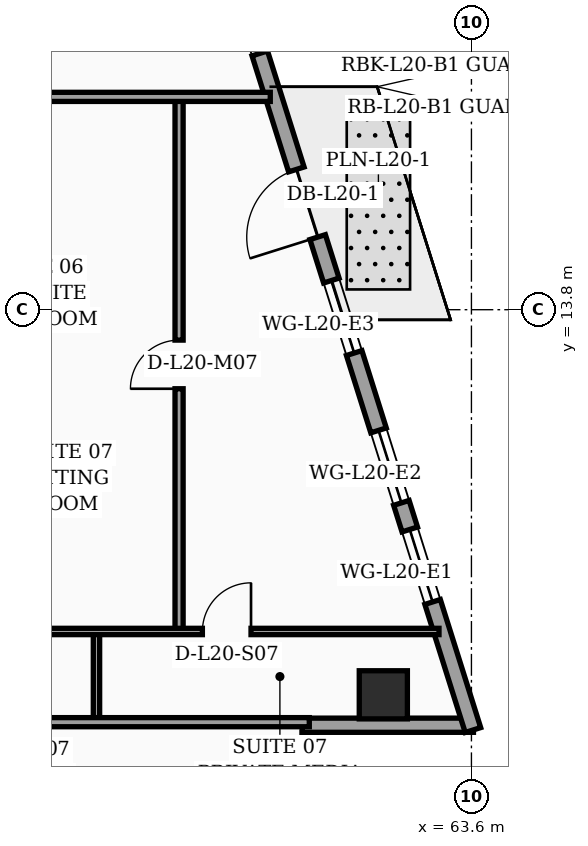
"""IFC4 building model, lengths in metres.
Left out: names, types, materials, properties, quantities, classifications, styles, units other than length and angle.
Written with IfcOpenShell. Run it as: python <this file> out.ifc"""

import sys

from ifc_helpers import new_model, si_unit, direction, frame, frame_2d, origin, origin_2d, place, context, subcontext, project, spatial, rectangle, hollow_rectangle, extrude, element, fill, save


model = new_model("IFC4")
c1 = context("Model", 3, precision=1e-05, world=origin(), true_north=direction((0.0, 1.0)))
c2 = subcontext(c1, "Body", "Model", "MODEL_VIEW")
j1 = project(units=[si_unit("LENGTHUNIT", "METRE"), si_unit("PLANEANGLEUNIT", "RADIAN")], contexts=[c1])
p1 = place(None, origin())
s1 = spatial("IfcSite", under=j1, at=p1, CompositionType="ELEMENT")
p2 = place(p1, origin())
s2 = spatial("IfcBuilding", under=s1, at=p2, CompositionType="ELEMENT")
p3 = place(p2, frame((0.0, 0.0, 85.0)))
s3 = spatial("IfcBuildingStorey", under=s2, at=p3, CompositionType="ELEMENT", Elevation=85.0)
p4 = place(p3, frame((61.861, 6.2, 0.0), z_axis=(0.0, 0.0, 1.0), x_axis=(1.0, 0.0, 0.0)))
e1 = element("IfcColumn", 1, at=p4, inside=s3, PredefinedType="COLUMN", context=c2, shape_type="SweptSolid", body=[
    extrude(hollow_rectangle(XDim=0.95, YDim=0.95, WallThickness=0.04, at=origin_2d()), origin(), (0.0, 0.0, 1.0), 3.56),
])
p5 = place(p3, frame((60.4, 2.52, 0.0), z_axis=(0.0, 0.0, 1.0), x_axis=(0.0, 1.0, 0.0)))
e2 = element("IfcWall", 2, at=p5, inside=s3, PredefinedType="SOLIDWALL", context=c2, shape_type="SweptSolid", body=[
    extrude(rectangle(XDim=2.94, YDim=0.28, at=frame_2d((1.47, 0.0))), origin(), (0.0, 0.0, 1.0), 3.04),
])
p6 = place(p3, frame((60.26, 5.6, 0.0), z_axis=(0.0, 0.0, 1.0), x_axis=(1.0, 0.0, 0.0)))
e3 = element("IfcWall", 3, at=p6, inside=s3, PredefinedType="SOLIDWALL", context=c2, shape_type="SweptSolid", body=[
    extrude(rectangle(XDim=3.38, YDim=0.28, at=frame_2d((1.69, 0.0))), origin(), (0.0, 0.0, 1.0), 3.04),
])
p7 = place(p3, frame((63.63, 5.505, 0.0), z_axis=(0.0, 0.0, 1.0), x_axis=(-0.300501856448, 0.953781229775, 0.0)))
e4 = element("IfcWall", 4, at=p7, inside=s3, PredefinedType="SOLIDWALL", context=c2, shape_type="SweptSolid", body=[
    extrude(rectangle(XDim=30.814, YDim=0.32, at=frame_2d((15.407, 0.0))), origin(), (0.0, 0.0, 1.0), 3.56),
])
p8 = place(p7, frame((10.199, 0.0, 0.0)))
e5 = element("IfcOpeningElement", 5, at=p8, cuts=e4, PredefinedType="OPENING", context=c2, shape_type="SweptSolid", body=[
    extrude(rectangle(XDim=1.4, YDim=2.25, at=frame_2d((0.7, 1.125))), frame((0.0, 0.17, 0.0), z_axis=(0.0, -1.0, 0.0), x_axis=(1.0, 0.0, 0.0)), (0.0, 0.0, 1.0), 0.34),
])
p9 = place(p7, frame((2.65, 0.0, 0.75)))
e6 = element("IfcOpeningElement", 6, at=p9, cuts=e4, PredefinedType="OPENING", context=c2, shape_type="SweptSolid", body=[
    extrude(rectangle(XDim=1.5, YDim=1.6, at=frame_2d((0.75, 0.8))), frame((0.0, 0.17, 0.0), z_axis=(0.0, -1.0, 0.0), x_axis=(1.0, 0.0, 0.0)), (0.0, 0.0, 1.0), 0.34),
])
p10 = place(p7, frame((4.7, 0.0, 0.75)))
e7 = element("IfcOpeningElement", 7, at=p10, cuts=e4, PredefinedType="OPENING", context=c2, shape_type="SweptSolid", body=[
    extrude(rectangle(XDim=1.5, YDim=1.6, at=frame_2d((0.75, 0.8))), frame((0.0, 0.17, 0.0), z_axis=(0.0, -1.0, 0.0), x_axis=(1.0, 0.0, 0.0)), (0.0, 0.0, 1.0), 0.34),
])
p11 = place(p7, frame((7.8, 0.0, 0.75)))
e8 = element("IfcOpeningElement", 8, at=p11, cuts=e4, PredefinedType="OPENING", context=c2, shape_type="SweptSolid", body=[
    extrude(rectangle(XDim=1.5, YDim=1.6, at=frame_2d((0.75, 0.8))), frame((0.0, 0.17, 0.0), z_axis=(0.0, -1.0, 0.0), x_axis=(1.0, 0.0, 0.0)), (0.0, 0.0, 1.0), 0.34),
])
p12 = place(p7, frame((14.0, 0.0, 0.75)))
e9 = element("IfcOpeningElement", 9, at=p12, cuts=e4, PredefinedType="OPENING", context=c2, shape_type="SweptSolid", body=[
    extrude(rectangle(XDim=1.5, YDim=1.6, at=frame_2d((0.75, 0.8))), frame((0.0, 0.17, 0.0), z_axis=(0.0, -1.0, 0.0), x_axis=(1.0, 0.0, 0.0)), (0.0, 0.0, 1.0), 0.34),
])
p13 = place(p7, frame((17.1, 0.0, 0.75)))
e10 = element("IfcOpeningElement", 10, at=p13, cuts=e4, PredefinedType="OPENING", context=c2, shape_type="SweptSolid", body=[
    extrude(rectangle(XDim=1.5, YDim=1.6, at=frame_2d((0.75, 0.8))), frame((0.0, 0.17, 0.0), z_axis=(0.0, -1.0, 0.0), x_axis=(1.0, 0.0, 0.0)), (0.0, 0.0, 1.0), 0.34),
])
p14 = place(p7, frame((20.2, 0.0, 0.75)))
e11 = element("IfcOpeningElement", 11, at=p14, cuts=e4, PredefinedType="OPENING", context=c2, shape_type="SweptSolid", body=[
    extrude(rectangle(XDim=1.5, YDim=1.6, at=frame_2d((0.75, 0.8))), frame((0.0, 0.17, 0.0), z_axis=(0.0, -1.0, 0.0), x_axis=(1.0, 0.0, 0.0)), (0.0, 0.0, 1.0), 0.34),
])
p15 = place(p7, frame((23.3, 0.0, 0.75)))
e12 = element("IfcOpeningElement", 12, at=p15, cuts=e4, PredefinedType="OPENING", context=c2, shape_type="SweptSolid", body=[
    extrude(rectangle(XDim=1.5, YDim=1.6, at=frame_2d((0.75, 0.8))), frame((0.0, 0.17, 0.0), z_axis=(0.0, -1.0, 0.0), x_axis=(1.0, 0.0, 0.0)), (0.0, 0.0, 1.0), 0.34),
])
p16 = place(p7, frame((26.4, 0.0, 0.75)))
e13 = element("IfcOpeningElement", 13, at=p16, cuts=e4, PredefinedType="OPENING", context=c2, shape_type="SweptSolid", body=[
    extrude(rectangle(XDim=1.5, YDim=1.6, at=frame_2d((0.75, 0.8))), frame((0.0, 0.17, 0.0), z_axis=(0.0, -1.0, 0.0), x_axis=(1.0, 0.0, 0.0)), (0.0, 0.0, 1.0), 0.34),
])
p17 = place(p3, frame((56.2, 5.66, 0.0), z_axis=(0.0, 0.0, 1.0), x_axis=(0.0, 1.0, 0.0)))
e14 = element("IfcWall", 14, at=p17, inside=s3, PredefinedType="PARTITIONING", context=c2, shape_type="SweptSolid", body=[
    extrude(rectangle(XDim=1.79, YDim=0.125, at=frame_2d((0.895, 0.0))), origin(), (0.0, 0.0, 1.0), 3.56),
])
p18 = place(p3, frame((57.83, 7.45, 0.0), z_axis=(0.0, 0.0, 1.0), x_axis=(0.0, 1.0, 0.0)))
e15 = element("IfcWall", 15, at=p18, inside=s3, PredefinedType="PARTITIONING", context=c2, shape_type="SweptSolid", body=[
    extrude(rectangle(XDim=10.55, YDim=0.16, at=frame_2d((5.275, 0.0))), origin(), (0.0, 0.0, 1.0), 3.04),
])
p19 = place(p18, frame((4.79, 0.0, 0.0)))
e16 = element("IfcOpeningElement", 16, at=p19, cuts=e15, PredefinedType="OPENING", context=c2, shape_type="SweptSolid", body=[
    extrude(rectangle(XDim=0.96, YDim=2.2, at=frame_2d((0.48, 1.1))), frame((0.0, 0.09, 0.0), z_axis=(0.0, -1.0, 0.0), x_axis=(1.0, 0.0, 0.0)), (0.0, 0.0, 1.0), 0.18),
])
p20 = place(p3, frame((53.25, 7.45, 0.0), z_axis=(0.0, 0.0, 1.0), x_axis=(1.0, 0.0, 0.0)))
e17 = element("IfcWall", 17, at=p20, inside=s3, PredefinedType="PARTITIONING", context=c2, shape_type="SweptSolid", body=[
    extrude(rectangle(XDim=9.71, YDim=0.125, at=frame_2d((4.855, 0.0))), origin(), (0.0, 0.0, 1.0), 3.04),
])
p21 = place(p20, frame((0.5, 0.0, 0.0)))
e18 = element("IfcOpeningElement", 18, at=p21, cuts=e17, PredefinedType="OPENING", context=c2, shape_type="SweptSolid", body=[
    extrude(rectangle(XDim=0.9, YDim=2.15, at=frame_2d((0.45, 1.075))), frame((0.0, 0.073, 0.0), z_axis=(0.0, -1.0, 0.0), x_axis=(1.0, 0.0, 0.0)), (0.0, 0.0, 1.0), 0.145),
])
p22 = place(p20, frame((5.04, 0.0, 0.0)))
e19 = element("IfcOpeningElement", 19, at=p22, cuts=e17, PredefinedType="OPENING", context=c2, shape_type="SweptSolid", body=[
    extrude(rectangle(XDim=0.96, YDim=2.2, at=frame_2d((0.48, 1.1))), frame((0.0, 0.073, 0.0), z_axis=(0.0, -1.0, 0.0), x_axis=(1.0, 0.0, 0.0)), (0.0, 0.0, 1.0), 0.145),
])
p23 = place(p3, frame((53.25, 5.66, 0.0), z_axis=(0.0, 0.0, 1.0), x_axis=(1.0, 0.0, 0.0)))
e20 = element("IfcWall", 20, at=p23, inside=s3, PredefinedType="PARTITIONING", context=c2, shape_type="SweptSolid", body=[
    extrude(rectangle(XDim=7.15, YDim=0.18, at=frame_2d((3.575, 0.0))), origin(), (0.0, 0.0, 1.0), 3.04),
])
p24 = place(p3, frame((53.25, 18.0, 0.0), z_axis=(0.0, 0.0, 1.0), x_axis=(1.0, 0.0, 0.0)))
e21 = element("IfcWall", 21, at=p24, inside=s3, PredefinedType="PARTITIONING", context=c2, shape_type="SweptSolid", body=[
    extrude(rectangle(XDim=6.38, YDim=0.18, at=frame_2d((3.19, 0.0))), origin(), (0.0, 0.0, 1.0), 3.04),
])
p25 = place(p8, origin())
e22 = element("IfcDoor", 22, at=p25, inside=s3, OperationType="SINGLE_SWING_LEFT", PredefinedType="DOOR", context=c2, shape_type="SweptSolid", body=[
    extrude(rectangle(XDim=1.4, YDim=2.25, at=frame_2d((0.7, 1.125))), frame((0.0, 0.025, 0.0), z_axis=(0.0, -1.0, 0.0), x_axis=(1.0, 0.0, 0.0)), (0.0, 0.0, 1.0), 0.05),
])
fill(e5, e22)
p26 = place(p9, origin())
e23 = element("IfcWindow", 23, at=p26, inside=s3, PartitioningType="SINGLE_PANEL", PredefinedType="WINDOW", context=c2, shape_type="SweptSolid", body=[
    extrude(rectangle(XDim=1.5, YDim=1.6, at=frame_2d((0.75, 0.8))), frame((0.0, 0.03, 0.0), z_axis=(0.0, -1.0, 0.0), x_axis=(1.0, 0.0, 0.0)), (0.0, 0.0, 1.0), 0.06),
])
fill(e6, e23)
p27 = place(p10, origin())
e24 = element("IfcWindow", 24, at=p27, inside=s3, PartitioningType="SINGLE_PANEL", PredefinedType="WINDOW", context=c2, shape_type="SweptSolid", body=[
    extrude(rectangle(XDim=1.5, YDim=1.6, at=frame_2d((0.75, 0.8))), frame((0.0, 0.03, 0.0), z_axis=(0.0, -1.0, 0.0), x_axis=(1.0, 0.0, 0.0)), (0.0, 0.0, 1.0), 0.06),
])
fill(e7, e24)
p28 = place(p11, origin())
e25 = element("IfcWindow", 25, at=p28, inside=s3, PartitioningType="SINGLE_PANEL", PredefinedType="WINDOW", context=c2, shape_type="SweptSolid", body=[
    extrude(rectangle(XDim=1.5, YDim=1.6, at=frame_2d((0.75, 0.8))), frame((0.0, 0.03, 0.0), z_axis=(0.0, -1.0, 0.0), x_axis=(1.0, 0.0, 0.0)), (0.0, 0.0, 1.0), 0.06),
])
fill(e8, e25)
p29 = place(p12, origin())
e26 = element("IfcWindow", 26, at=p29, inside=s3, PartitioningType="SINGLE_PANEL", PredefinedType="WINDOW", context=c2, shape_type="SweptSolid", body=[
    extrude(rectangle(XDim=1.5, YDim=1.6, at=frame_2d((0.75, 0.8))), frame((0.0, 0.03, 0.0), z_axis=(0.0, -1.0, 0.0), x_axis=(1.0, 0.0, 0.0)), (0.0, 0.0, 1.0), 0.06),
])
fill(e9, e26)
p30 = place(p19, origin())
e27 = element("IfcDoor", 27, at=p30, inside=s3, OperationType="SINGLE_SWING_LEFT", PredefinedType="DOOR", context=c2, shape_type="SweptSolid", body=[
    extrude(rectangle(XDim=0.96, YDim=2.2, at=frame_2d((0.48, 1.1))), frame((0.0, 0.025, 0.0), z_axis=(0.0, -1.0, 0.0), x_axis=(1.0, 0.0, 0.0)), (0.0, 0.0, 1.0), 0.05),
])
fill(e16, e27)
p31 = place(p22, origin())
e28 = element("IfcDoor", 28, at=p31, inside=s3, OperationType="SINGLE_SWING_RIGHT", PredefinedType="DOOR", context=c2, shape_type="SweptSolid", body=[
    extrude(rectangle(XDim=0.96, YDim=2.2, at=frame_2d((0.48, 1.1))), frame((0.0, 0.025, 0.0), z_axis=(0.0, -1.0, 0.0), x_axis=(1.0, 0.0, 0.0)), (0.0, 0.0, 1.0), 0.05),
])
fill(e19, e28)
save(model, sys.argv[1])
